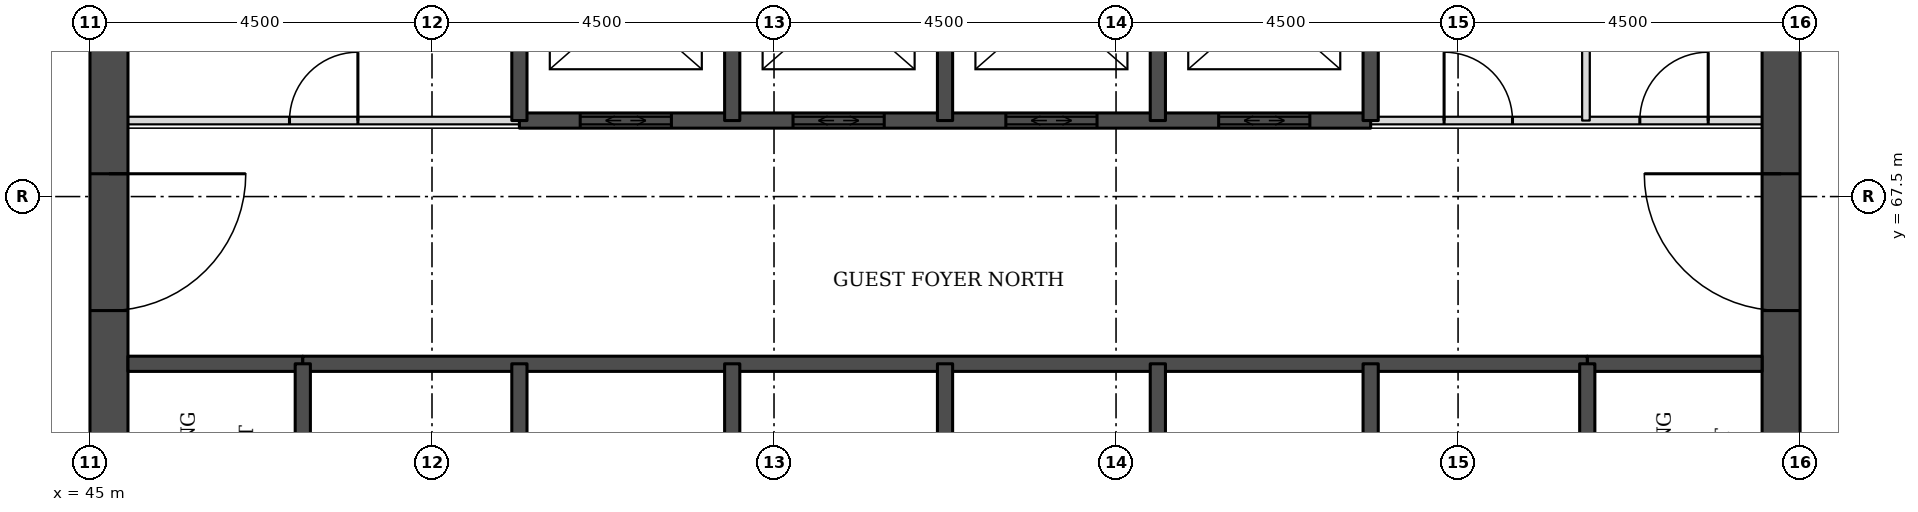
"""IFC4 building model, lengths in metres.
Left out: names, types, materials, properties, quantities, classifications, styles, units other than length and angle.
Written with IfcOpenShell. Run it as: python <this file> out.ifc"""

import sys

from ifc_helpers import new_model, si_unit, direction, frame, frame_2d, origin, place, context, subcontext, project, spatial, rectangle, extrude, element, fill, save


model = new_model("IFC4")
c1 = context("Model", 3, precision=1e-05, world=origin(), true_north=direction((0.0, 1.0)))
c2 = subcontext(c1, "Body", "Model", "MODEL_VIEW")
j1 = project(units=[si_unit("LENGTHUNIT", "METRE"), si_unit("PLANEANGLEUNIT", "RADIAN")], contexts=[c1])
p1 = place(None, origin())
s1 = spatial("IfcSite", under=j1, at=p1, CompositionType="ELEMENT")
p2 = place(p1, origin())
s2 = spatial("IfcBuilding", under=s1, at=p2, CompositionType="ELEMENT")
p3 = place(p2, frame((0.0, 0.0, 29.7)))
s3 = spatial("IfcBuildingStorey", under=s2, at=p3, CompositionType="ELEMENT", Elevation=29.7)
p4 = place(p3, frame((45.25, 49.5, 0.0), z_axis=(0.0, 0.0, 1.0), x_axis=(0.0, 1.0, 0.0)))
e1 = element("IfcWall", 1, at=p4, inside=s3, PredefinedType="SHEAR", context=c2, shape_type="SweptSolid", body=[
    extrude(rectangle(XDim=22.5, YDim=0.5, at=frame_2d((11.25, 0.0))), origin(), (0.0, 0.0, 1.0), 3.3),
])
p5 = place(p4, frame((4.2, 0.0, 0.0)))
e2 = element("IfcOpeningElement", 2, at=p5, cuts=e1, PredefinedType="OPENING", context=c2, shape_type="SweptSolid", body=[
    extrude(rectangle(XDim=1.8, YDim=2.1, at=frame_2d((0.9, 1.05))), frame((0.0, 0.26, 0.0), z_axis=(0.0, -1.0, 0.0), x_axis=(1.0, 0.0, 0.0)), (0.0, 0.0, 1.0), 0.52),
])
p6 = place(p4, frame((6.9, 0.0, 0.0)))
e3 = element("IfcOpeningElement", 3, at=p6, cuts=e1, PredefinedType="OPENING", context=c2, shape_type="SweptSolid", body=[
    extrude(rectangle(XDim=1.1, YDim=2.1, at=frame_2d((0.55, 1.05))), frame((0.0, 0.26, 0.0), z_axis=(0.0, -1.0, 0.0), x_axis=(1.0, 0.0, 0.0)), (0.0, 0.0, 1.0), 0.52),
])
p7 = place(p4, frame((13.6, 0.0, 0.0)))
e4 = element("IfcOpeningElement", 4, at=p7, cuts=e1, PredefinedType="OPENING", context=c2, shape_type="SweptSolid", body=[
    extrude(rectangle(XDim=1.1, YDim=2.1, at=frame_2d((0.55, 1.05))), frame((0.0, 0.26, 0.0), z_axis=(0.0, -1.0, 0.0), x_axis=(1.0, 0.0, 0.0)), (0.0, 0.0, 1.0), 0.52),
])
p8 = place(p4, frame((16.5, 0.0, 0.0)))
e5 = element("IfcOpeningElement", 5, at=p8, cuts=e1, PredefinedType="OPENING", context=c2, shape_type="SweptSolid", body=[
    extrude(rectangle(XDim=1.8, YDim=2.1, at=frame_2d((0.9, 1.05))), frame((0.0, 0.26, 0.0), z_axis=(0.0, -1.0, 0.0), x_axis=(1.0, 0.0, 0.0)), (0.0, 0.0, 1.0), 0.52),
])
p9 = place(p3, frame((67.25, 49.5, 0.0), z_axis=(0.0, 0.0, 1.0), x_axis=(0.0, 1.0, 0.0)))
e6 = element("IfcWall", 6, at=p9, inside=s3, PredefinedType="SHEAR", context=c2, shape_type="SweptSolid", body=[
    extrude(rectangle(XDim=22.5, YDim=0.5, at=frame_2d((11.25, 0.0))), origin(), (0.0, 0.0, 1.0), 3.3),
])
p10 = place(p9, frame((4.2, 0.0, 0.0)))
e7 = element("IfcOpeningElement", 7, at=p10, cuts=e6, PredefinedType="OPENING", context=c2, shape_type="SweptSolid", body=[
    extrude(rectangle(XDim=1.8, YDim=2.1, at=frame_2d((0.9, 1.05))), frame((0.0, 0.26, 0.0), z_axis=(0.0, -1.0, 0.0), x_axis=(1.0, 0.0, 0.0)), (0.0, 0.0, 1.0), 0.52),
])
p11 = place(p9, frame((6.9, 0.0, 0.0)))
e8 = element("IfcOpeningElement", 8, at=p11, cuts=e6, PredefinedType="OPENING", context=c2, shape_type="SweptSolid", body=[
    extrude(rectangle(XDim=1.1, YDim=2.1, at=frame_2d((0.55, 1.05))), frame((0.0, 0.26, 0.0), z_axis=(0.0, -1.0, 0.0), x_axis=(1.0, 0.0, 0.0)), (0.0, 0.0, 1.0), 0.52),
])
p12 = place(p9, frame((13.6, 0.0, 0.0)))
e9 = element("IfcOpeningElement", 9, at=p12, cuts=e6, PredefinedType="OPENING", context=c2, shape_type="SweptSolid", body=[
    extrude(rectangle(XDim=1.1, YDim=2.1, at=frame_2d((0.55, 1.05))), frame((0.0, 0.26, 0.0), z_axis=(0.0, -1.0, 0.0), x_axis=(1.0, 0.0, 0.0)), (0.0, 0.0, 1.0), 0.52),
])
p13 = place(p9, frame((16.5, 0.0, 0.0)))
e10 = element("IfcOpeningElement", 10, at=p13, cuts=e6, PredefinedType="OPENING", context=c2, shape_type="SweptSolid", body=[
    extrude(rectangle(XDim=1.8, YDim=2.1, at=frame_2d((0.9, 1.05))), frame((0.0, 0.26, 0.0), z_axis=(0.0, -1.0, 0.0), x_axis=(1.0, 0.0, 0.0)), (0.0, 0.0, 1.0), 0.52),
])
for number, where, z_axis, x_axis in (
    (11, (45.5, 65.3, 0.0), (0.0, 0.0, 1.0), (1.0, 0.0, 0.0)),
    (12, (64.7, 65.3, 0.0), (0.0, 0.0, 1.0), (1.0, 0.0, 0.0)),
):
    element("IfcWall", number, at=place(p3, frame(where, z_axis=z_axis, x_axis=x_axis)), inside=s3, PredefinedType="SOLIDWALL", context=c2, shape_type="SweptSolid", body=[
        extrude(rectangle(XDim=2.3, YDim=0.2, at=frame_2d((1.15, 0.0))), origin(), (0.0, 0.0, 1.0), 3.08),
    ])
p14 = place(p3, frame((47.8, 65.3, 0.0), z_axis=(0.0, 0.0, 1.0), x_axis=(1.0, 0.0, 0.0)))
e13 = element("IfcWall", 13, at=p14, inside=s3, PredefinedType="SOLIDWALL", context=c2, shape_type="SweptSolid", body=[
    extrude(rectangle(XDim=16.9, YDim=0.2, at=frame_2d((8.45, 0.0))), origin(), (0.0, 0.0, 1.0), 3.08),
])
p15 = place(p3, frame((45.5, 68.5, 0.0), z_axis=(0.0, 0.0, 1.0), x_axis=(1.0, 0.0, 0.0)))
e14 = element("IfcWall", 14, at=p15, inside=s3, PredefinedType="PARTITIONING", context=c2, shape_type="SweptSolid", body=[
    extrude(rectangle(XDim=5.15, YDim=0.1, at=frame_2d((2.575, 0.0))), origin(), (0.0, 0.0, 1.0), 3.08),
])
p16 = place(p15, frame((2.125, 0.0, 0.0)))
e15 = element("IfcOpeningElement", 15, at=p16, cuts=e14, PredefinedType="OPENING", context=c2, shape_type="SweptSolid", body=[
    extrude(rectangle(XDim=0.9, YDim=2.1, at=frame_2d((0.45, 1.05))), frame((0.0, 0.06, 0.0), z_axis=(0.0, -1.0, 0.0), x_axis=(1.0, 0.0, 0.0)), (0.0, 0.0, 1.0), 0.12),
])
p17 = place(p3, frame((61.85, 68.5, 0.0), z_axis=(0.0, 0.0, 1.0), x_axis=(1.0, 0.0, 0.0)))
e16 = element("IfcWall", 16, at=p17, inside=s3, PredefinedType="PARTITIONING", context=c2, shape_type="SweptSolid", body=[
    extrude(rectangle(XDim=5.15, YDim=0.1, at=frame_2d((2.575, 0.0))), origin(), (0.0, 0.0, 1.0), 3.08),
])
p18 = place(p17, frame((3.541, 0.0, 0.0)))
e17 = element("IfcOpeningElement", 17, at=p18, cuts=e16, PredefinedType="OPENING", context=c2, shape_type="SweptSolid", body=[
    extrude(rectangle(XDim=0.9, YDim=2.1, at=frame_2d((0.45, 1.05))), frame((0.0, 0.06, 0.0), z_axis=(0.0, -1.0, 0.0), x_axis=(1.0, 0.0, 0.0)), (0.0, 0.0, 1.0), 0.12),
])
p19 = place(p17, frame((0.966, 0.0, 0.0)))
e18 = element("IfcOpeningElement", 18, at=p19, cuts=e16, PredefinedType="OPENING", context=c2, shape_type="SweptSolid", body=[
    extrude(rectangle(XDim=0.9, YDim=2.1, at=frame_2d((0.45, 1.05))), frame((0.0, 0.06, 0.0), z_axis=(0.0, -1.0, 0.0), x_axis=(1.0, 0.0, 0.0)), (0.0, 0.0, 1.0), 0.12),
])
p20 = place(p3, frame((50.65, 68.5, 0.0), z_axis=(0.0, 0.0, 1.0), x_axis=(1.0, 0.0, 0.0)))
e19 = element("IfcWall", 19, at=p20, inside=s3, PredefinedType="SOLIDWALL", context=c2, shape_type="SweptSolid", body=[
    extrude(rectangle(XDim=11.2, YDim=0.2, at=frame_2d((5.6, 0.0))), origin(), (0.0, 0.0, 1.0), 3.08),
])
p21 = place(p20, frame((0.8, 0.0, 0.0)))
e20 = element("IfcOpeningElement", 20, at=p21, cuts=e19, PredefinedType="OPENING", context=c2, shape_type="SweptSolid", body=[
    extrude(rectangle(XDim=1.2, YDim=2.1, at=frame_2d((0.6, 1.05))), frame((0.0, 0.11, 0.0), z_axis=(0.0, -1.0, 0.0), x_axis=(1.0, 0.0, 0.0)), (0.0, 0.0, 1.0), 0.22),
])
p22 = place(p20, frame((3.6, 0.0, 0.0)))
e21 = element("IfcOpeningElement", 21, at=p22, cuts=e19, PredefinedType="OPENING", context=c2, shape_type="SweptSolid", body=[
    extrude(rectangle(XDim=1.2, YDim=2.1, at=frame_2d((0.6, 1.05))), frame((0.0, 0.11, 0.0), z_axis=(0.0, -1.0, 0.0), x_axis=(1.0, 0.0, 0.0)), (0.0, 0.0, 1.0), 0.22),
])
p23 = place(p20, frame((6.4, 0.0, 0.0)))
e22 = element("IfcOpeningElement", 22, at=p23, cuts=e19, PredefinedType="OPENING", context=c2, shape_type="SweptSolid", body=[
    extrude(rectangle(XDim=1.2, YDim=2.1, at=frame_2d((0.6, 1.05))), frame((0.0, 0.11, 0.0), z_axis=(0.0, -1.0, 0.0), x_axis=(1.0, 0.0, 0.0)), (0.0, 0.0, 1.0), 0.22),
])
p24 = place(p20, frame((9.2, 0.0, 0.0)))
e23 = element("IfcOpeningElement", 23, at=p24, cuts=e19, PredefinedType="OPENING", context=c2, shape_type="SweptSolid", body=[
    extrude(rectangle(XDim=1.2, YDim=2.1, at=frame_2d((0.6, 1.05))), frame((0.0, 0.11, 0.0), z_axis=(0.0, -1.0, 0.0), x_axis=(1.0, 0.0, 0.0)), (0.0, 0.0, 1.0), 0.22),
])
p25 = place(p3, frame((47.8, 62.0, 0.0), z_axis=(0.0, 0.0, 1.0), x_axis=(0.0, 1.0, 0.0)))
e24 = element("IfcWall", 24, at=p25, inside=s3, PredefinedType="SOLIDWALL", context=c2, shape_type="SweptSolid", body=[
    extrude(rectangle(XDim=3.3, YDim=0.2, at=frame_2d((1.65, 0.0))), origin(), (0.0, 0.0, 1.0), 3.08),
])
p26 = place(p25, frame((1.1, 0.0, 0.0)))
e25 = element("IfcOpeningElement", 25, at=p26, cuts=e24, PredefinedType="OPENING", context=c2, shape_type="SweptSolid", body=[
    extrude(rectangle(XDim=1.1, YDim=2.1, at=frame_2d((0.55, 1.05))), frame((0.0, 0.11, 0.0), z_axis=(0.0, -1.0, 0.0), x_axis=(1.0, 0.0, 0.0)), (0.0, 0.0, 1.0), 0.22),
])
p27 = place(p3, frame((50.65, 62.0, 0.0), z_axis=(0.0, 0.0, 1.0), x_axis=(0.0, 1.0, 0.0)))
e26 = element("IfcWall", 26, at=p27, inside=s3, PredefinedType="SOLIDWALL", context=c2, shape_type="SweptSolid", body=[
    extrude(rectangle(XDim=3.3, YDim=0.2, at=frame_2d((1.65, 0.0))), origin(), (0.0, 0.0, 1.0), 3.08),
])
p28 = place(p3, frame((50.65, 68.5, 0.0), z_axis=(0.0, 0.0, 1.0), x_axis=(0.0, 1.0, 0.0)))
e27 = element("IfcWall", 27, at=p28, inside=s3, PredefinedType="SOLIDWALL", context=c2, shape_type="SweptSolid", body=[
    extrude(rectangle(XDim=3.0, YDim=0.2, at=frame_2d((1.5, 0.0))), origin(), (0.0, 0.0, 1.0), 3.08),
])
p29 = place(p3, frame((53.45, 62.5, 0.0), z_axis=(0.0, 0.0, 1.0), x_axis=(0.0, 1.0, 0.0)))
e28 = element("IfcWall", 28, at=p29, inside=s3, PredefinedType="SOLIDWALL", context=c2, shape_type="SweptSolid", body=[
    extrude(rectangle(XDim=2.8, YDim=0.2, at=frame_2d((1.4, 0.0))), origin(), (0.0, 0.0, 1.0), 3.08),
])
p30 = place(p3, frame((53.45, 68.5, 0.0), z_axis=(0.0, 0.0, 1.0), x_axis=(0.0, 1.0, 0.0)))
e29 = element("IfcWall", 29, at=p30, inside=s3, PredefinedType="SOLIDWALL", context=c2, shape_type="SweptSolid", body=[
    extrude(rectangle(XDim=3.0, YDim=0.2, at=frame_2d((1.5, 0.0))), origin(), (0.0, 0.0, 1.0), 3.08),
])
p31 = place(p3, frame((56.25, 62.5, 0.0), z_axis=(0.0, 0.0, 1.0), x_axis=(0.0, 1.0, 0.0)))
e30 = element("IfcWall", 30, at=p31, inside=s3, PredefinedType="SOLIDWALL", context=c2, shape_type="SweptSolid", body=[
    extrude(rectangle(XDim=2.8, YDim=0.2, at=frame_2d((1.4, 0.0))), origin(), (0.0, 0.0, 1.0), 3.08),
])
p32 = place(p3, frame((56.25, 68.5, 0.0), z_axis=(0.0, 0.0, 1.0), x_axis=(0.0, 1.0, 0.0)))
e31 = element("IfcWall", 31, at=p32, inside=s3, PredefinedType="SOLIDWALL", context=c2, shape_type="SweptSolid", body=[
    extrude(rectangle(XDim=3.0, YDim=0.2, at=frame_2d((1.5, 0.0))), origin(), (0.0, 0.0, 1.0), 3.08),
])
p33 = place(p3, frame((59.05, 62.5, 0.0), z_axis=(0.0, 0.0, 1.0), x_axis=(0.0, 1.0, 0.0)))
e32 = element("IfcWall", 32, at=p33, inside=s3, PredefinedType="SOLIDWALL", context=c2, shape_type="SweptSolid", body=[
    extrude(rectangle(XDim=2.8, YDim=0.2, at=frame_2d((1.4, 0.0))), origin(), (0.0, 0.0, 1.0), 3.08),
])
p34 = place(p3, frame((59.05, 68.5, 0.0), z_axis=(0.0, 0.0, 1.0), x_axis=(0.0, 1.0, 0.0)))
e33 = element("IfcWall", 33, at=p34, inside=s3, PredefinedType="SOLIDWALL", context=c2, shape_type="SweptSolid", body=[
    extrude(rectangle(XDim=3.0, YDim=0.2, at=frame_2d((1.5, 0.0))), origin(), (0.0, 0.0, 1.0), 3.08),
])
p35 = place(p3, frame((61.85, 62.0, 0.0), z_axis=(0.0, 0.0, 1.0), x_axis=(0.0, 1.0, 0.0)))
e34 = element("IfcWall", 34, at=p35, inside=s3, PredefinedType="SOLIDWALL", context=c2, shape_type="SweptSolid", body=[
    extrude(rectangle(XDim=3.3, YDim=0.2, at=frame_2d((1.65, 0.0))), origin(), (0.0, 0.0, 1.0), 3.08),
])
p36 = place(p3, frame((61.85, 68.5, 0.0), z_axis=(0.0, 0.0, 1.0), x_axis=(0.0, 1.0, 0.0)))
e35 = element("IfcWall", 35, at=p36, inside=s3, PredefinedType="SOLIDWALL", context=c2, shape_type="SweptSolid", body=[
    extrude(rectangle(XDim=3.0, YDim=0.2, at=frame_2d((1.5, 0.0))), origin(), (0.0, 0.0, 1.0), 3.08),
])
p37 = place(p3, frame((64.683, 68.5, 0.0), z_axis=(0.0, 0.0, 1.0), x_axis=(0.0, 1.0, 0.0)))
e36 = element("IfcWall", 36, at=p37, inside=s3, PredefinedType="PARTITIONING", context=c2, shape_type="SweptSolid", body=[
    extrude(rectangle(XDim=3.0, YDim=0.1, at=frame_2d((1.5, 0.0))), origin(), (0.0, 0.0, 1.0), 3.08),
])
p38 = place(p3, frame((64.7, 62.0, 0.0), z_axis=(0.0, 0.0, 1.0), x_axis=(0.0, 1.0, 0.0)))
e37 = element("IfcWall", 37, at=p38, inside=s3, PredefinedType="SOLIDWALL", context=c2, shape_type="SweptSolid", body=[
    extrude(rectangle(XDim=3.3, YDim=0.2, at=frame_2d((1.65, 0.0))), origin(), (0.0, 0.0, 1.0), 3.08),
])
p39 = place(p38, frame((1.1, 0.0, 0.0)))
e38 = element("IfcOpeningElement", 38, at=p39, cuts=e37, PredefinedType="OPENING", context=c2, shape_type="SweptSolid", body=[
    extrude(rectangle(XDim=1.1, YDim=2.1, at=frame_2d((0.55, 1.05))), frame((0.0, 0.11, 0.0), z_axis=(0.0, -1.0, 0.0), x_axis=(1.0, 0.0, 0.0)), (0.0, 0.0, 1.0), 0.22),
])
p40 = place(p21, origin())
e39 = element("IfcDoor", 39, at=p40, inside=s3, OperationType="DOUBLE_DOOR_SLIDING", PredefinedType="DOOR", context=c2, shape_type="SweptSolid", body=[
    extrude(rectangle(XDim=1.2, YDim=2.1, at=frame_2d((0.6, 1.05))), frame((0.0, 0.025, 0.0), z_axis=(0.0, -1.0, 0.0), x_axis=(1.0, 0.0, 0.0)), (0.0, 0.0, 1.0), 0.05),
])
fill(e20, e39)
p41 = place(p22, origin())
e40 = element("IfcDoor", 40, at=p41, inside=s3, OperationType="DOUBLE_DOOR_SLIDING", PredefinedType="DOOR", context=c2, shape_type="SweptSolid", body=[
    extrude(rectangle(XDim=1.2, YDim=2.1, at=frame_2d((0.6, 1.05))), frame((0.0, 0.025, 0.0), z_axis=(0.0, -1.0, 0.0), x_axis=(1.0, 0.0, 0.0)), (0.0, 0.0, 1.0), 0.05),
])
fill(e21, e40)
p42 = place(p23, origin())
e41 = element("IfcDoor", 41, at=p42, inside=s3, OperationType="DOUBLE_DOOR_SLIDING", PredefinedType="DOOR", context=c2, shape_type="SweptSolid", body=[
    extrude(rectangle(XDim=1.2, YDim=2.1, at=frame_2d((0.6, 1.05))), frame((0.0, 0.025, 0.0), z_axis=(0.0, -1.0, 0.0), x_axis=(1.0, 0.0, 0.0)), (0.0, 0.0, 1.0), 0.05),
])
fill(e22, e41)
p43 = place(p24, origin())
e42 = element("IfcDoor", 42, at=p43, inside=s3, OperationType="DOUBLE_DOOR_SLIDING", PredefinedType="DOOR", context=c2, shape_type="SweptSolid", body=[
    extrude(rectangle(XDim=1.2, YDim=2.1, at=frame_2d((0.6, 1.05))), frame((0.0, 0.025, 0.0), z_axis=(0.0, -1.0, 0.0), x_axis=(1.0, 0.0, 0.0)), (0.0, 0.0, 1.0), 0.05),
])
fill(e23, e42)
p44 = place(p8, frame((1.8, 0.0, 0.0), z_axis=(0.0, 0.0, 1.0), x_axis=(-1.0, 0.0, 0.0)))
e43 = element("IfcDoor", 43, at=p44, inside=s3, OperationType="SINGLE_SWING_LEFT", PredefinedType="DOOR", context=c2, shape_type="SweptSolid", body=[
    extrude(rectangle(XDim=1.8, YDim=2.1, at=frame_2d((0.9, 1.05))), frame((0.0, 0.025, 0.0), z_axis=(0.0, -1.0, 0.0), x_axis=(1.0, 0.0, 0.0)), (0.0, 0.0, 1.0), 0.05),
])
fill(e5, e43)
p45 = place(p13, origin())
e44 = element("IfcDoor", 44, at=p45, inside=s3, OperationType="SINGLE_SWING_RIGHT", PredefinedType="DOOR", context=c2, shape_type="SweptSolid", body=[
    extrude(rectangle(XDim=1.8, YDim=2.1, at=frame_2d((0.9, 1.05))), frame((0.0, 0.025, 0.0), z_axis=(0.0, -1.0, 0.0), x_axis=(1.0, 0.0, 0.0)), (0.0, 0.0, 1.0), 0.05),
])
fill(e10, e44)
p46 = place(p18, origin())
e45 = element("IfcDoor", 45, at=p46, inside=s3, OperationType="SINGLE_SWING_RIGHT", PredefinedType="DOOR", context=c2, shape_type="SweptSolid", body=[
    extrude(rectangle(XDim=0.9, YDim=2.1, at=frame_2d((0.45, 1.05))), frame((0.0, 0.025, 0.0), z_axis=(0.0, -1.0, 0.0), x_axis=(1.0, 0.0, 0.0)), (0.0, 0.0, 1.0), 0.05),
])
fill(e17, e45)
p47 = place(p19, origin())
e46 = element("IfcDoor", 46, at=p47, inside=s3, OperationType="SINGLE_SWING_LEFT", PredefinedType="DOOR", context=c2, shape_type="SweptSolid", body=[
    extrude(rectangle(XDim=0.9, YDim=2.1, at=frame_2d((0.45, 1.05))), frame((0.0, 0.025, 0.0), z_axis=(0.0, -1.0, 0.0), x_axis=(1.0, 0.0, 0.0)), (0.0, 0.0, 1.0), 0.05),
])
fill(e18, e46)
p48 = place(p16, origin())
e47 = element("IfcDoor", 47, at=p48, inside=s3, OperationType="SINGLE_SWING_RIGHT", PredefinedType="DOOR", context=c2, shape_type="SweptSolid", body=[
    extrude(rectangle(XDim=0.9, YDim=2.1, at=frame_2d((0.45, 1.05))), frame((0.0, 0.025, 0.0), z_axis=(0.0, -1.0, 0.0), x_axis=(1.0, 0.0, 0.0)), (0.0, 0.0, 1.0), 0.05),
])
fill(e15, e47)
save(model, sys.argv[1])
